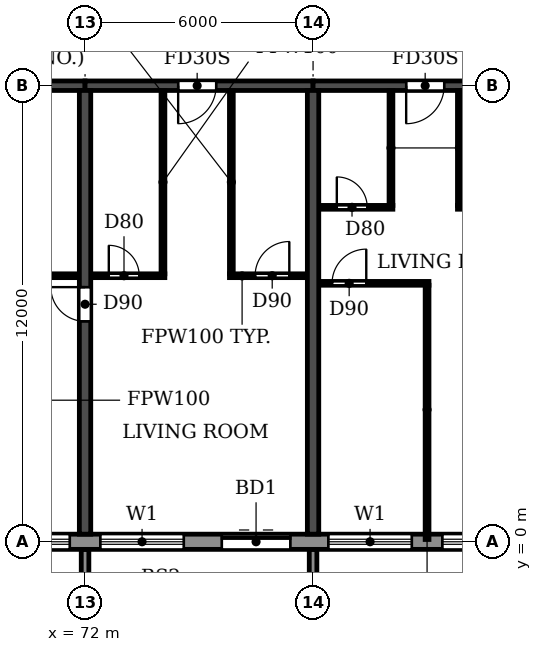
"""IFC4 building model, lengths in metres.
Left out: names, types, materials, properties, quantities, classifications, styles, units other than length and angle.
Written with IfcOpenShell. Run it as: python <this file> out.ifc"""

import sys

from ifc_helpers import new_model, si_unit, direction, frame, frame_2d, origin, place, context, subcontext, project, spatial, polyline, rectangle, outline, extrude, source, transform, mapped, element, fill, save


model = new_model("IFC4")
c1 = context("Model", 3, precision=1e-05, world=origin(), true_north=direction((0.0, 1.0)))
c2 = subcontext(c1, "Body", "Model", "MODEL_VIEW")
j1 = project(units=[si_unit("LENGTHUNIT", "METRE"), si_unit("PLANEANGLEUNIT", "RADIAN")], contexts=[c1])
p1 = place(None, origin())
s1 = spatial("IfcSite", under=j1, at=p1, CompositionType="ELEMENT")
p2 = place(p1, origin())
s2 = spatial("IfcBuilding", under=s1, at=p2, CompositionType="ELEMENT")
p3 = place(p2, frame((0.0, 0.0, 132.3)))
s3 = spatial("IfcBuildingStorey", under=s2, at=p3, CompositionType="ELEMENT", Elevation=132.3)
p4 = place(p3, frame((72.0, 0.2, 0.0), z_axis=(0.0, 0.0, 1.0), x_axis=(0.0, 1.0, 0.0)))
e1 = element("IfcWall", 1, at=p4, inside=s3, PredefinedType="SHEAR", context=c2, shape_type="SweptSolid", body=[
    extrude(rectangle(XDim=11.675, YDim=0.3, at=frame_2d((5.837, 0.0))), origin(), (0.0, 0.0, 1.0), 3.07),
])
p5 = place(p4, frame((5.6, 0.0, 0.0)))
e2 = element("IfcOpeningElement", 2, at=p5, cuts=e1, PredefinedType="OPENING", context=c2, shape_type="SweptSolid", body=[
    extrude(rectangle(XDim=0.9, YDim=2.1, at=frame_2d((0.45, 1.05))), frame((0.0, 0.16, 0.0), z_axis=(0.0, -1.0, 0.0), x_axis=(1.0, 0.0, 0.0)), (0.0, 0.0, 1.0), 0.32),
])
p6 = place(p3, frame((78.0, 0.2, 0.0), z_axis=(0.0, 0.0, 1.0), x_axis=(0.0, 1.0, 0.0)))
e3 = element("IfcWall", 3, at=p6, inside=s3, PredefinedType="SHEAR", context=c2, shape_type="SweptSolid", body=[
    extrude(rectangle(XDim=11.675, YDim=0.3, at=frame_2d((5.837, 0.0))), origin(), (0.0, 0.0, 1.0), 3.07),
])
p7 = place(p3, frame((66.0, 12.0, 0.0), z_axis=(0.0, 0.0, 1.0), x_axis=(1.0, 0.0, 0.0)))
e4 = element("IfcWall", 4, at=p7, inside=s3, PredefinedType="SHEAR", context=c2, shape_type="SweptSolid", body=[
    extrude(rectangle(XDim=6.0, YDim=0.25, at=frame_2d((3.0, 0.0))), origin(), (0.0, 0.0, 1.0), 2.47),
])
p8 = place(p3, frame((72.0, 12.0, 0.0), z_axis=(0.0, 0.0, 1.0), x_axis=(1.0, 0.0, 0.0)))
e5 = element("IfcWall", 5, at=p8, inside=s3, PredefinedType="SHEAR", context=c2, shape_type="SweptSolid", body=[
    extrude(rectangle(XDim=6.0, YDim=0.25, at=frame_2d((3.0, 0.0))), origin(), (0.0, 0.0, 1.0), 2.47),
])
p9 = place(p8, frame((2.45, 0.0, 0.0)))
e6 = element("IfcOpeningElement", 6, at=p9, cuts=e5, PredefinedType="OPENING", context=c2, shape_type="SweptSolid", body=[
    extrude(rectangle(XDim=1.0, YDim=2.1, at=frame_2d((0.5, 1.05))), frame((0.0, 0.135, 0.0), z_axis=(0.0, -1.0, 0.0), x_axis=(1.0, 0.0, 0.0)), (0.0, 0.0, 1.0), 0.27),
])
p10 = place(p3, frame((78.0, 12.0, 0.0), z_axis=(0.0, 0.0, 1.0), x_axis=(1.0, 0.0, 0.0)))
e7 = element("IfcWall", 7, at=p10, inside=s3, PredefinedType="SHEAR", context=c2, shape_type="SweptSolid", body=[
    extrude(rectangle(XDim=6.0, YDim=0.25, at=frame_2d((3.0, 0.0))), origin(), (0.0, 0.0, 1.0), 2.47),
])
p11 = place(p10, frame((2.45, 0.0, 0.0)))
e8 = element("IfcOpeningElement", 8, at=p11, cuts=e7, PredefinedType="OPENING", context=c2, shape_type="SweptSolid", body=[
    extrude(rectangle(XDim=1.0, YDim=2.1, at=frame_2d((0.5, 1.05))), frame((0.0, 0.135, 0.0), z_axis=(0.0, -1.0, 0.0), x_axis=(1.0, 0.0, 0.0)), (0.0, 0.0, 1.0), 0.27),
])
p12 = place(p3, frame((16.683, 0.0, 0.0), z_axis=(0.0, 0.0, 1.0), x_axis=(1.0, 0.0, 0.0)))
e9 = element("IfcWall", 9, at=p12, inside=s3, PredefinedType="STANDARD", context=c2, shape_type="SweptSolid", body=[
    extrude(rectangle(XDim=68.634, YDim=0.4, at=frame_2d((34.317, 0.0))), origin(), (0.0, 0.0, 1.0), 3.07),
])
p13 = place(p12, frame((1.717, 0.0, 0.9)))
e10 = element("IfcOpeningElement", 10, at=p13, cuts=e9, PredefinedType="OPENING", context=c2, shape_type="SweptSolid", body=[
    extrude(rectangle(XDim=2.2, YDim=1.5, at=frame_2d((1.1, 0.75))), frame((0.0, 0.21, 0.0), z_axis=(0.0, -1.0, 0.0), x_axis=(1.0, 0.0, 0.0)), (0.0, 0.0, 1.0), 0.42),
])
p14 = place(p12, frame((4.717, 0.0, 0.9)))
e11 = element("IfcOpeningElement", 11, at=p14, cuts=e9, PredefinedType="OPENING", context=c2, shape_type="SweptSolid", body=[
    extrude(rectangle(XDim=2.2, YDim=1.5, at=frame_2d((1.1, 0.75))), frame((0.0, 0.21, 0.0), z_axis=(0.0, -1.0, 0.0), x_axis=(1.0, 0.0, 0.0)), (0.0, 0.0, 1.0), 0.42),
])
p15 = place(p12, frame((7.717, 0.0, 0.9)))
e12 = element("IfcOpeningElement", 12, at=p15, cuts=e9, PredefinedType="OPENING", context=c2, shape_type="SweptSolid", body=[
    extrude(rectangle(XDim=2.2, YDim=1.5, at=frame_2d((1.1, 0.75))), frame((0.0, 0.21, 0.0), z_axis=(0.0, -1.0, 0.0), x_axis=(1.0, 0.0, 0.0)), (0.0, 0.0, 1.0), 0.42),
])
p16 = place(p12, frame((10.917, 0.0, 0.0)))
e13 = element("IfcOpeningElement", 13, at=p16, cuts=e9, PredefinedType="OPENING", context=c2, shape_type="SweptSolid", body=[
    extrude(rectangle(XDim=1.8, YDim=2.4, at=frame_2d((0.9, 1.2))), frame((0.0, 0.21, 0.0), z_axis=(0.0, -1.0, 0.0), x_axis=(1.0, 0.0, 0.0)), (0.0, 0.0, 1.0), 0.42),
])
p17 = place(p12, frame((13.717, 0.0, 0.9)))
e14 = element("IfcOpeningElement", 14, at=p17, cuts=e9, PredefinedType="OPENING", context=c2, shape_type="SweptSolid", body=[
    extrude(rectangle(XDim=2.2, YDim=1.5, at=frame_2d((1.1, 0.75))), frame((0.0, 0.21, 0.0), z_axis=(0.0, -1.0, 0.0), x_axis=(1.0, 0.0, 0.0)), (0.0, 0.0, 1.0), 0.42),
])
p18 = place(p12, frame((16.717, 0.0, 0.9)))
e15 = element("IfcOpeningElement", 15, at=p18, cuts=e9, PredefinedType="OPENING", context=c2, shape_type="SweptSolid", body=[
    extrude(rectangle(XDim=2.2, YDim=1.5, at=frame_2d((1.1, 0.75))), frame((0.0, 0.21, 0.0), z_axis=(0.0, -1.0, 0.0), x_axis=(1.0, 0.0, 0.0)), (0.0, 0.0, 1.0), 0.42),
])
p19 = place(p12, frame((19.917, 0.0, 0.0)))
e16 = element("IfcOpeningElement", 16, at=p19, cuts=e9, PredefinedType="OPENING", context=c2, shape_type="SweptSolid", body=[
    extrude(rectangle(XDim=1.8, YDim=2.4, at=frame_2d((0.9, 1.2))), frame((0.0, 0.21, 0.0), z_axis=(0.0, -1.0, 0.0), x_axis=(1.0, 0.0, 0.0)), (0.0, 0.0, 1.0), 0.42),
])
p20 = place(p12, frame((22.717, 0.0, 0.9)))
e17 = element("IfcOpeningElement", 17, at=p20, cuts=e9, PredefinedType="OPENING", context=c2, shape_type="SweptSolid", body=[
    extrude(rectangle(XDim=2.2, YDim=1.5, at=frame_2d((1.1, 0.75))), frame((0.0, 0.21, 0.0), z_axis=(0.0, -1.0, 0.0), x_axis=(1.0, 0.0, 0.0)), (0.0, 0.0, 1.0), 0.42),
])
p21 = place(p12, frame((25.717, 0.0, 0.9)))
e18 = element("IfcOpeningElement", 18, at=p21, cuts=e9, PredefinedType="OPENING", context=c2, shape_type="SweptSolid", body=[
    extrude(rectangle(XDim=2.2, YDim=1.5, at=frame_2d((1.1, 0.75))), frame((0.0, 0.21, 0.0), z_axis=(0.0, -1.0, 0.0), x_axis=(1.0, 0.0, 0.0)), (0.0, 0.0, 1.0), 0.42),
])
p22 = place(p12, frame((28.717, 0.0, 0.9)))
e19 = element("IfcOpeningElement", 19, at=p22, cuts=e9, PredefinedType="OPENING", context=c2, shape_type="SweptSolid", body=[
    extrude(rectangle(XDim=2.2, YDim=1.5, at=frame_2d((1.1, 0.75))), frame((0.0, 0.21, 0.0), z_axis=(0.0, -1.0, 0.0), x_axis=(1.0, 0.0, 0.0)), (0.0, 0.0, 1.0), 0.42),
])
p23 = place(p12, frame((31.917, 0.0, 0.0)))
e20 = element("IfcOpeningElement", 20, at=p23, cuts=e9, PredefinedType="OPENING", context=c2, shape_type="SweptSolid", body=[
    extrude(rectangle(XDim=1.8, YDim=2.4, at=frame_2d((0.9, 1.2))), frame((0.0, 0.21, 0.0), z_axis=(0.0, -1.0, 0.0), x_axis=(1.0, 0.0, 0.0)), (0.0, 0.0, 1.0), 0.42),
])
p24 = place(p12, frame((34.717, 0.0, 0.9)))
e21 = element("IfcOpeningElement", 21, at=p24, cuts=e9, PredefinedType="OPENING", context=c2, shape_type="SweptSolid", body=[
    extrude(rectangle(XDim=2.2, YDim=1.5, at=frame_2d((1.1, 0.75))), frame((0.0, 0.21, 0.0), z_axis=(0.0, -1.0, 0.0), x_axis=(1.0, 0.0, 0.0)), (0.0, 0.0, 1.0), 0.42),
])
p25 = place(p12, frame((37.717, 0.0, 0.9)))
e22 = element("IfcOpeningElement", 22, at=p25, cuts=e9, PredefinedType="OPENING", context=c2, shape_type="SweptSolid", body=[
    extrude(rectangle(XDim=2.2, YDim=1.5, at=frame_2d((1.1, 0.75))), frame((0.0, 0.21, 0.0), z_axis=(0.0, -1.0, 0.0), x_axis=(1.0, 0.0, 0.0)), (0.0, 0.0, 1.0), 0.42),
])
p26 = place(p12, frame((40.717, 0.0, 0.9)))
e23 = element("IfcOpeningElement", 23, at=p26, cuts=e9, PredefinedType="OPENING", context=c2, shape_type="SweptSolid", body=[
    extrude(rectangle(XDim=2.2, YDim=1.5, at=frame_2d((1.1, 0.75))), frame((0.0, 0.21, 0.0), z_axis=(0.0, -1.0, 0.0), x_axis=(1.0, 0.0, 0.0)), (0.0, 0.0, 1.0), 0.42),
])
p27 = place(p12, frame((43.717, 0.0, 0.9)))
e24 = element("IfcOpeningElement", 24, at=p27, cuts=e9, PredefinedType="OPENING", context=c2, shape_type="SweptSolid", body=[
    extrude(rectangle(XDim=2.2, YDim=1.5, at=frame_2d((1.1, 0.75))), frame((0.0, 0.21, 0.0), z_axis=(0.0, -1.0, 0.0), x_axis=(1.0, 0.0, 0.0)), (0.0, 0.0, 1.0), 0.42),
])
p28 = place(p12, frame((46.917, 0.0, 0.0)))
e25 = element("IfcOpeningElement", 25, at=p28, cuts=e9, PredefinedType="OPENING", context=c2, shape_type="SweptSolid", body=[
    extrude(rectangle(XDim=1.8, YDim=2.4, at=frame_2d((0.9, 1.2))), frame((0.0, 0.21, 0.0), z_axis=(0.0, -1.0, 0.0), x_axis=(1.0, 0.0, 0.0)), (0.0, 0.0, 1.0), 0.42),
])
p29 = place(p12, frame((49.717, 0.0, 0.9)))
e26 = element("IfcOpeningElement", 26, at=p29, cuts=e9, PredefinedType="OPENING", context=c2, shape_type="SweptSolid", body=[
    extrude(rectangle(XDim=2.2, YDim=1.5, at=frame_2d((1.1, 0.75))), frame((0.0, 0.21, 0.0), z_axis=(0.0, -1.0, 0.0), x_axis=(1.0, 0.0, 0.0)), (0.0, 0.0, 1.0), 0.42),
])
p30 = place(p12, frame((52.717, 0.0, 0.9)))
e27 = element("IfcOpeningElement", 27, at=p30, cuts=e9, PredefinedType="OPENING", context=c2, shape_type="SweptSolid", body=[
    extrude(rectangle(XDim=2.2, YDim=1.5, at=frame_2d((1.1, 0.75))), frame((0.0, 0.21, 0.0), z_axis=(0.0, -1.0, 0.0), x_axis=(1.0, 0.0, 0.0)), (0.0, 0.0, 1.0), 0.42),
])
p31 = place(p12, frame((55.717, 0.0, 0.9)))
e28 = element("IfcOpeningElement", 28, at=p31, cuts=e9, PredefinedType="OPENING", context=c2, shape_type="SweptSolid", body=[
    extrude(rectangle(XDim=2.2, YDim=1.5, at=frame_2d((1.1, 0.75))), frame((0.0, 0.21, 0.0), z_axis=(0.0, -1.0, 0.0), x_axis=(1.0, 0.0, 0.0)), (0.0, 0.0, 1.0), 0.42),
])
p32 = place(p12, frame((58.917, 0.0, 0.0)))
e29 = element("IfcOpeningElement", 29, at=p32, cuts=e9, PredefinedType="OPENING", context=c2, shape_type="SweptSolid", body=[
    extrude(rectangle(XDim=1.8, YDim=2.4, at=frame_2d((0.9, 1.2))), frame((0.0, 0.21, 0.0), z_axis=(0.0, -1.0, 0.0), x_axis=(1.0, 0.0, 0.0)), (0.0, 0.0, 1.0), 0.42),
])
p33 = place(p12, frame((61.717, 0.0, 0.9)))
e30 = element("IfcOpeningElement", 30, at=p33, cuts=e9, PredefinedType="OPENING", context=c2, shape_type="SweptSolid", body=[
    extrude(rectangle(XDim=2.2, YDim=1.5, at=frame_2d((1.1, 0.75))), frame((0.0, 0.21, 0.0), z_axis=(0.0, -1.0, 0.0), x_axis=(1.0, 0.0, 0.0)), (0.0, 0.0, 1.0), 0.42),
])
p34 = place(p12, frame((64.717, 0.0, 0.9)))
e31 = element("IfcOpeningElement", 31, at=p34, cuts=e9, PredefinedType="OPENING", context=c2, shape_type="SweptSolid", body=[
    extrude(rectangle(XDim=2.2, YDim=1.5, at=frame_2d((1.1, 0.75))), frame((0.0, 0.21, 0.0), z_axis=(0.0, -1.0, 0.0), x_axis=(1.0, 0.0, 0.0)), (0.0, 0.0, 1.0), 0.42),
])
m1 = source(origin(), c2, "Body", "SweptSolid", [
    extrude(outline(polyline([(0.0, 0.0), (0.2, 0.0), (0.2, 1.65), (0.0, 1.65), (0.0, 0.0)])), origin(), (0.0, 0.0, 1.0), 3.1),
])
for number, where in (
    (32, (71.9, -1.85, 0.0)),
    (33, (77.9, -1.85, 0.0)),
):
    element("IfcWall", number, at=place(p3, frame(where)), inside=s3, PredefinedType="STANDARD", context=c2, shape_type="MappedRepresentation", body=[
        mapped(m1, transform((0.0, 0.0, 0.0))),
    ])
p35 = place(p3, frame((78.16, 6.8, 0.0), z_axis=(0.0, 0.0, 1.0), x_axis=(1.0, 0.0, 0.0)))
e34 = element("IfcWall", 34, at=p35, inside=s3, PredefinedType="PARTITIONING", context=c2, shape_type="SweptSolid", body=[
    extrude(rectangle(XDim=2.89, YDim=0.1, at=frame_2d((1.445, 0.0))), origin(), (0.0, 0.0, 1.0), 3.07),
])
p36 = place(p35, frame((0.34, 0.0, 0.0)))
e35 = element("IfcOpeningElement", 35, at=p36, cuts=e34, PredefinedType="OPENING", context=c2, shape_type="SweptSolid", body=[
    extrude(rectangle(XDim=0.9, YDim=2.1, at=frame_2d((0.45, 1.05))), frame((0.0, 0.06, 0.0), z_axis=(0.0, -1.0, 0.0), x_axis=(1.0, 0.0, 0.0)), (0.0, 0.0, 1.0), 0.12),
])
p37 = place(p3, frame((69.1, 7.0, 0.0), z_axis=(0.0, 0.0, 1.0), x_axis=(1.0, 0.0, 0.0)))
e36 = element("IfcWall", 36, at=p37, inside=s3, PredefinedType="PARTITIONING", context=c2, shape_type="SweptSolid", body=[
    extrude(rectangle(XDim=2.74, YDim=0.1, at=frame_2d((1.37, 0.0))), origin(), (0.0, 0.0, 1.0), 3.07),
])
p38 = place(p37, frame((1.0, 0.0, 0.0)))
e37 = element("IfcOpeningElement", 37, at=p38, cuts=e36, PredefinedType="OPENING", context=c2, shape_type="SweptSolid", body=[
    extrude(rectangle(XDim=0.8, YDim=2.1, at=frame_2d((0.4, 1.05))), frame((0.0, 0.06, 0.0), z_axis=(0.0, -1.0, 0.0), x_axis=(1.0, 0.0, 0.0)), (0.0, 0.0, 1.0), 0.12),
])
p39 = place(p3, frame((72.16, 7.0, 0.0), z_axis=(0.0, 0.0, 1.0), x_axis=(1.0, 0.0, 0.0)))
e38 = element("IfcWall", 38, at=p39, inside=s3, PredefinedType="PARTITIONING", context=c2, shape_type="SweptSolid", body=[
    extrude(rectangle(XDim=1.94, YDim=0.1, at=frame_2d((0.97, 0.0))), origin(), (0.0, 0.0, 1.0), 3.07),
])
p40 = place(p39, frame((0.465, 0.0, 0.0)))
e39 = element("IfcOpeningElement", 39, at=p40, cuts=e38, PredefinedType="OPENING", context=c2, shape_type="SweptSolid", body=[
    extrude(rectangle(XDim=0.8, YDim=2.1, at=frame_2d((0.4, 1.05))), frame((0.0, 0.06, 0.0), z_axis=(0.0, -1.0, 0.0), x_axis=(1.0, 0.0, 0.0)), (0.0, 0.0, 1.0), 0.12),
])
p41 = place(p3, frame((75.8, 7.0, 0.0), z_axis=(0.0, 0.0, 1.0), x_axis=(1.0, 0.0, 0.0)))
e40 = element("IfcWall", 40, at=p41, inside=s3, PredefinedType="PARTITIONING", context=c2, shape_type="SweptSolid", body=[
    extrude(rectangle(XDim=2.04, YDim=0.1, at=frame_2d((1.02, 0.0))), origin(), (0.0, 0.0, 1.0), 3.07),
])
p42 = place(p41, frame((0.675, 0.0, 0.0)))
e41 = element("IfcOpeningElement", 41, at=p42, cuts=e40, PredefinedType="OPENING", context=c2, shape_type="SweptSolid", body=[
    extrude(rectangle(XDim=0.9, YDim=2.1, at=frame_2d((0.45, 1.05))), frame((0.0, 0.06, 0.0), z_axis=(0.0, -1.0, 0.0), x_axis=(1.0, 0.0, 0.0)), (0.0, 0.0, 1.0), 0.12),
])
p43 = place(p3, frame((78.16, 8.8, 0.0), z_axis=(0.0, 0.0, 1.0), x_axis=(1.0, 0.0, 0.0)))
e42 = element("IfcWall", 42, at=p43, inside=s3, PredefinedType="PARTITIONING", context=c2, shape_type="SweptSolid", body=[
    extrude(rectangle(XDim=1.94, YDim=0.1, at=frame_2d((0.97, 0.0))), origin(), (0.0, 0.0, 1.0), 3.07),
])
p44 = place(p43, frame((0.465, 0.0, 0.0)))
e43 = element("IfcOpeningElement", 43, at=p44, cuts=e42, PredefinedType="OPENING", context=c2, shape_type="SweptSolid", body=[
    extrude(rectangle(XDim=0.8, YDim=2.1, at=frame_2d((0.4, 1.05))), frame((0.0, 0.06, 0.0), z_axis=(0.0, -1.0, 0.0), x_axis=(1.0, 0.0, 0.0)), (0.0, 0.0, 1.0), 0.12),
])
p45 = place(p3, frame((81.8, 8.8, 0.0), z_axis=(0.0, 0.0, 1.0), x_axis=(1.0, 0.0, 0.0)))
e44 = element("IfcWall", 44, at=p45, inside=s3, PredefinedType="PARTITIONING", context=c2, shape_type="SweptSolid", body=[
    extrude(rectangle(XDim=2.04, YDim=0.1, at=frame_2d((1.02, 0.0))), origin(), (0.0, 0.0, 1.0), 3.07),
])
p46 = place(p45, frame((0.675, 0.0, 0.0)))
e45 = element("IfcOpeningElement", 45, at=p46, cuts=e44, PredefinedType="OPENING", context=c2, shape_type="SweptSolid", body=[
    extrude(rectangle(XDim=0.9, YDim=2.1, at=frame_2d((0.45, 1.05))), frame((0.0, 0.06, 0.0), z_axis=(0.0, -1.0, 0.0), x_axis=(1.0, 0.0, 0.0)), (0.0, 0.0, 1.0), 0.12),
])
for number, where, z_axis, x_axis in (
    (46, (74.05, 7.05, 0.0), (0.0, 0.0, 1.0), (0.0, 1.0, 0.0)),
    (47, (75.85, 7.05, 0.0), (0.0, 0.0, 1.0), (0.0, 1.0, 0.0)),
):
    element("IfcWall", number, at=place(p3, frame(where, z_axis=z_axis, x_axis=x_axis)), inside=s3, PredefinedType="PARTITIONING", context=c2, shape_type="SweptSolid", body=[
        extrude(rectangle(XDim=4.815, YDim=0.1, at=frame_2d((2.407, 0.0))), origin(), (0.0, 0.0, 1.0), 3.07),
    ])
p47 = place(p3, frame((80.05, 8.85, 0.0), z_axis=(0.0, 0.0, 1.0), x_axis=(0.0, 1.0, 0.0)))
e48 = element("IfcWall", 48, at=p47, inside=s3, PredefinedType="PARTITIONING", context=c2, shape_type="SweptSolid", body=[
    extrude(rectangle(XDim=3.015, YDim=0.1, at=frame_2d((1.507, 0.0))), origin(), (0.0, 0.0, 1.0), 3.07),
])
p48 = place(p3, frame((81.0, 0.06, 0.0), z_axis=(0.0, 0.0, 1.0), x_axis=(0.0, 1.0, 0.0)))
e49 = element("IfcWall", 49, at=p48, inside=s3, PredefinedType="PARTITIONING", context=c2, shape_type="SweptSolid", body=[
    extrude(rectangle(XDim=6.69, YDim=0.1, at=frame_2d((3.345, 0.0))), origin(), (0.0, 0.0, 1.0), 3.07),
])
p49 = place(p3, frame((81.85, 8.85, 0.0), z_axis=(0.0, 0.0, 1.0), x_axis=(0.0, 1.0, 0.0)))
e50 = element("IfcWall", 50, at=p49, inside=s3, PredefinedType="PARTITIONING", context=c2, shape_type="SweptSolid", body=[
    extrude(rectangle(XDim=3.015, YDim=0.1, at=frame_2d((1.507, 0.0))), origin(), (0.0, 0.0, 1.0), 3.07),
])
p50 = place(p30, origin())
e51 = element("IfcWindow", 51, at=p50, inside=s3, PartitioningType="DOUBLE_PANEL_HORIZONTAL", PredefinedType="WINDOW", context=c2, shape_type="SweptSolid", body=[
    extrude(rectangle(XDim=2.2, YDim=1.5, at=frame_2d((1.1, 0.75))), frame((0.0, 0.03, 0.0), z_axis=(0.0, -1.0, 0.0), x_axis=(1.0, 0.0, 0.0)), (0.0, 0.0, 1.0), 0.06),
])
fill(e27, e51)
p51 = place(p31, origin())
e52 = element("IfcWindow", 52, at=p51, inside=s3, PartitioningType="DOUBLE_PANEL_HORIZONTAL", PredefinedType="WINDOW", context=c2, shape_type="SweptSolid", body=[
    extrude(rectangle(XDim=2.2, YDim=1.5, at=frame_2d((1.1, 0.75))), frame((0.0, 0.03, 0.0), z_axis=(0.0, -1.0, 0.0), x_axis=(1.0, 0.0, 0.0)), (0.0, 0.0, 1.0), 0.06),
])
fill(e28, e52)
p52 = place(p32, origin())
e53 = element("IfcDoor", 53, at=p52, inside=s3, OperationType="DOUBLE_DOOR_SLIDING", PredefinedType="DOOR", context=c2, shape_type="SweptSolid", body=[
    extrude(rectangle(XDim=1.8, YDim=2.4, at=frame_2d((0.9, 1.2))), frame((0.0, 0.025, 0.0), z_axis=(0.0, -1.0, 0.0), x_axis=(1.0, 0.0, 0.0)), (0.0, 0.0, 1.0), 0.05),
])
fill(e29, e53)
p53 = place(p33, origin())
e54 = element("IfcWindow", 54, at=p53, inside=s3, PartitioningType="DOUBLE_PANEL_HORIZONTAL", PredefinedType="WINDOW", context=c2, shape_type="SweptSolid", body=[
    extrude(rectangle(XDim=2.2, YDim=1.5, at=frame_2d((1.1, 0.75))), frame((0.0, 0.03, 0.0), z_axis=(0.0, -1.0, 0.0), x_axis=(1.0, 0.0, 0.0)), (0.0, 0.0, 1.0), 0.06),
])
fill(e30, e54)
p54 = place(p34, origin())
e55 = element("IfcWindow", 55, at=p54, inside=s3, PartitioningType="DOUBLE_PANEL_HORIZONTAL", PredefinedType="WINDOW", context=c2, shape_type="SweptSolid", body=[
    extrude(rectangle(XDim=2.2, YDim=1.5, at=frame_2d((1.1, 0.75))), frame((0.0, 0.03, 0.0), z_axis=(0.0, -1.0, 0.0), x_axis=(1.0, 0.0, 0.0)), (0.0, 0.0, 1.0), 0.06),
])
fill(e31, e55)
p55 = place(p5, origin())
e56 = element("IfcDoor", 56, at=p55, inside=s3, OperationType="SINGLE_SWING_RIGHT", PredefinedType="DOOR", context=c2, shape_type="SweptSolid", body=[
    extrude(rectangle(XDim=0.9, YDim=2.1, at=frame_2d((0.45, 1.05))), frame((0.0, 0.025, 0.0), z_axis=(0.0, -1.0, 0.0), x_axis=(1.0, 0.0, 0.0)), (0.0, 0.0, 1.0), 0.05),
])
fill(e2, e56)
p56 = place(p40, origin())
e57 = element("IfcDoor", 57, at=p56, inside=s3, OperationType="SINGLE_SWING_LEFT", PredefinedType="DOOR", context=c2, shape_type="SweptSolid", body=[
    extrude(rectangle(XDim=0.8, YDim=2.1, at=frame_2d((0.4, 1.05))), frame((0.0, 0.025, 0.0), z_axis=(0.0, -1.0, 0.0), x_axis=(1.0, 0.0, 0.0)), (0.0, 0.0, 1.0), 0.05),
])
fill(e39, e57)
p57 = place(p9, frame((1.0, 0.0, 0.0), z_axis=(0.0, 0.0, 1.0), x_axis=(-1.0, 0.0, 0.0)))
e58 = element("IfcDoor", 58, at=p57, inside=s3, OperationType="SINGLE_SWING_RIGHT", PredefinedType="DOOR", context=c2, shape_type="SweptSolid", body=[
    extrude(rectangle(XDim=1.0, YDim=2.1, at=frame_2d((0.5, 1.05))), frame((0.0, 0.025, 0.0), z_axis=(0.0, -1.0, 0.0), x_axis=(1.0, 0.0, 0.0)), (0.0, 0.0, 1.0), 0.05),
])
fill(e6, e58)
p58 = place(p42, origin())
e59 = element("IfcDoor", 59, at=p58, inside=s3, OperationType="SINGLE_SWING_RIGHT", PredefinedType="DOOR", context=c2, shape_type="SweptSolid", body=[
    extrude(rectangle(XDim=0.9, YDim=2.1, at=frame_2d((0.45, 1.05))), frame((0.0, 0.025, 0.0), z_axis=(0.0, -1.0, 0.0), x_axis=(1.0, 0.0, 0.0)), (0.0, 0.0, 1.0), 0.05),
])
fill(e41, e59)
p59 = place(p36, origin())
e60 = element("IfcDoor", 60, at=p59, inside=s3, OperationType="SINGLE_SWING_RIGHT", PredefinedType="DOOR", context=c2, shape_type="SweptSolid", body=[
    extrude(rectangle(XDim=0.9, YDim=2.1, at=frame_2d((0.45, 1.05))), frame((0.0, 0.025, 0.0), z_axis=(0.0, -1.0, 0.0), x_axis=(1.0, 0.0, 0.0)), (0.0, 0.0, 1.0), 0.05),
])
fill(e35, e60)
p60 = place(p44, origin())
e61 = element("IfcDoor", 61, at=p60, inside=s3, OperationType="SINGLE_SWING_LEFT", PredefinedType="DOOR", context=c2, shape_type="SweptSolid", body=[
    extrude(rectangle(XDim=0.8, YDim=2.1, at=frame_2d((0.4, 1.05))), frame((0.0, 0.025, 0.0), z_axis=(0.0, -1.0, 0.0), x_axis=(1.0, 0.0, 0.0)), (0.0, 0.0, 1.0), 0.05),
])
fill(e43, e61)
p61 = place(p11, frame((1.0, 0.0, 0.0), z_axis=(0.0, 0.0, 1.0), x_axis=(-1.0, 0.0, 0.0)))
e62 = element("IfcDoor", 62, at=p61, inside=s3, OperationType="SINGLE_SWING_RIGHT", PredefinedType="DOOR", context=c2, shape_type="SweptSolid", body=[
    extrude(rectangle(XDim=1.0, YDim=2.1, at=frame_2d((0.5, 1.05))), frame((0.0, 0.025, 0.0), z_axis=(0.0, -1.0, 0.0), x_axis=(1.0, 0.0, 0.0)), (0.0, 0.0, 1.0), 0.05),
])
fill(e8, e62)
save(model, sys.argv[1])
